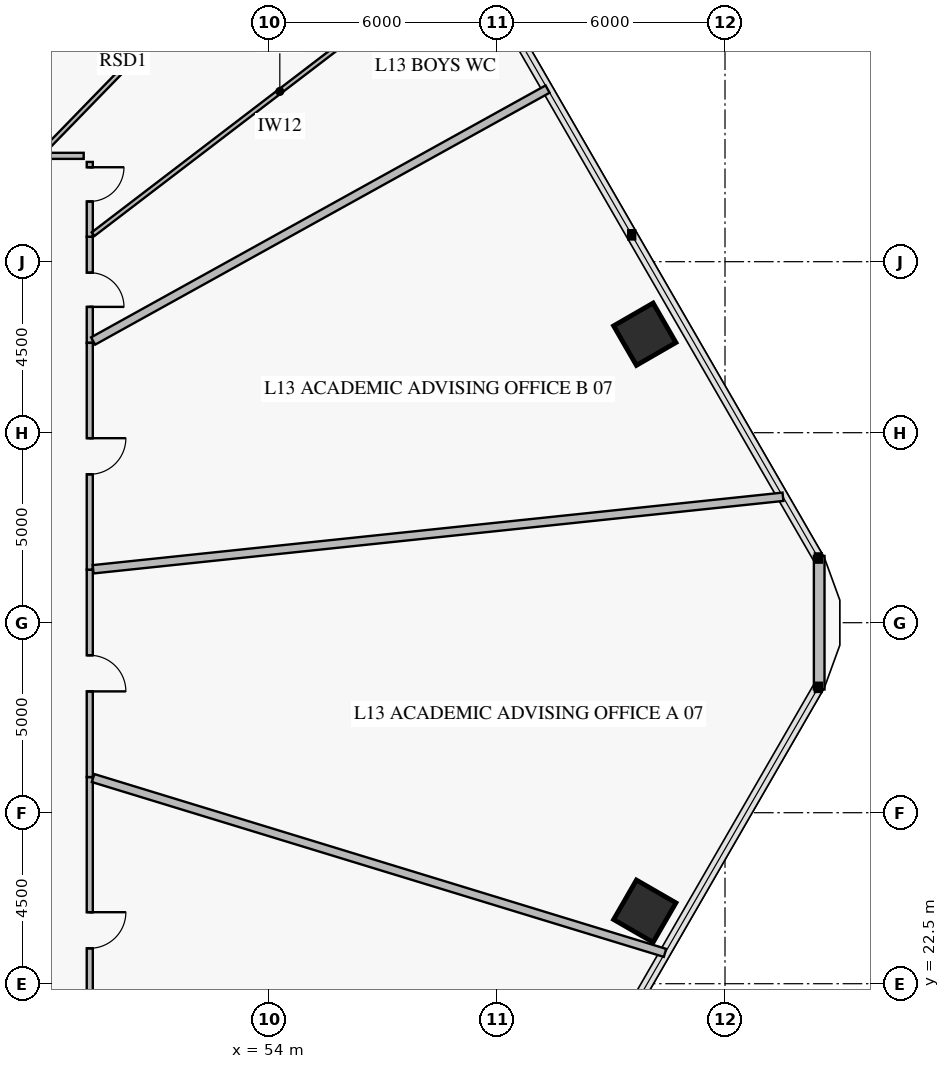
"""IFC4 building model, lengths in metres.
Left out: names, types, materials, properties, quantities, classifications, styles, units other than length and angle.
Written with IfcOpenShell. Run it as: python <this file> out.ifc"""

import sys

from ifc_helpers import new_model, si_unit, direction, frame, frame_2d, origin, origin_2d, place, context, subcontext, project, spatial, rectangle, extrude, element, fill, save


model = new_model("IFC4")
c1 = context("Model", 3, precision=1e-05, world=origin(), true_north=direction((0.0, 1.0)))
c2 = subcontext(c1, "Body", "Model", "MODEL_VIEW")
j1 = project(units=[si_unit("LENGTHUNIT", "METRE"), si_unit("PLANEANGLEUNIT", "RADIAN")], contexts=[c1])
p1 = place(None, origin())
s1 = spatial("IfcSite", under=j1, at=p1, CompositionType="ELEMENT")
p2 = place(p1, origin())
s2 = spatial("IfcBuilding", under=s1, at=p2, CompositionType="ELEMENT")
p3 = place(p2, frame((0.0, 0.0, 54.0)))
s3 = spatial("IfcBuildingStorey", under=s2, at=p3, CompositionType="ELEMENT", Elevation=54.0)
for number, where, z_axis, x_axis in (
    (1, (63.889, 39.592, 0.0), (0.0, 0.0, 1.0), (-0.5, 0.866, 0.0)),
    (2, (63.889, 24.408, 0.0), (0.0, 0.0, 1.0), (0.5, 0.866, 0.0)),
):
    element("IfcColumn", number, at=place(p3, frame(where, z_axis=z_axis, x_axis=x_axis)), inside=s3, PredefinedType="COLUMN", context=c2, shape_type="SweptSolid", body=[
        extrude(rectangle(XDim=1.2, YDim=1.2, at=origin_2d()), origin(), (0.0, 0.0, 1.0), 3.92),
    ])
p4 = place(p3, frame((68.479, 33.758, 0.0), z_axis=(0.0, 0.0, 1.0), x_axis=(0.0, -1.0, 0.0)))
e3 = element("IfcWall", 3, at=p4, inside=s3, PredefinedType="SOLIDWALL", context=c2, shape_type="SweptSolid", body=[
    extrude(rectangle(XDim=3.515, YDim=0.28, at=frame_2d((1.758, 0.0))), origin(), (0.0, 0.0, 1.0), 3.92),
])
p5 = place(p3, frame((49.285, 39.364, 0.0), z_axis=(0.0, 0.0, 1.0), x_axis=(0.0, 1.0, 0.0)))
e4 = element("IfcWall", 4, at=p5, inside=s3, PredefinedType="PARTITIONING", context=c2, shape_type="SweptSolid", body=[
    extrude(rectangle(XDim=2.793, YDim=0.16, at=frame_2d((1.396, 0.0))), origin(), (0.0, 0.0, 1.0), 3.92),
])
p6 = place(p5, frame((0.947, 0.0, 0.0)))
e5 = element("IfcOpeningElement", 5, at=p6, cuts=e4, PredefinedType="OPENING", context=c2, shape_type="SweptSolid", body=[
    extrude(rectangle(XDim=0.9, YDim=2.1, at=frame_2d((0.45, 1.05))), frame((0.0, 0.092, 0.0), z_axis=(0.0, -1.0, 0.0), x_axis=(1.0, 0.0, 0.0)), (0.0, 0.0, 1.0), 0.184),
])
p7 = place(p3, frame((49.285, 42.157, 0.0), z_axis=(0.0, 0.0, 1.0), x_axis=(0.0, 1.0, 0.0)))
e6 = element("IfcWall", 6, at=p7, inside=s3, PredefinedType="PARTITIONING", context=c2, shape_type="SweptSolid", body=[
    extrude(rectangle(XDim=1.968, YDim=0.16, at=frame_2d((0.984, 0.0))), origin(), (0.0, 0.0, 1.0), 3.92),
])
p8 = place(p7, frame((0.928, 0.0, 0.0)))
e7 = element("IfcOpeningElement", 7, at=p8, cuts=e6, PredefinedType="OPENING", context=c2, shape_type="SweptSolid", body=[
    extrude(rectangle(XDim=0.9, YDim=2.1, at=frame_2d((0.45, 1.05))), frame((0.0, 0.092, 0.0), z_axis=(0.0, -1.0, 0.0), x_axis=(1.0, 0.0, 0.0)), (0.0, 0.0, 1.0), 0.184),
])
p9 = place(p3, frame((49.285, 19.875, 0.0), z_axis=(0.0, 0.0, 1.0), x_axis=(0.0, 1.0, 0.0)))
e8 = element("IfcWall", 8, at=p9, inside=s3, PredefinedType="PARTITIONING", context=c2, shape_type="SweptSolid", body=[
    extrude(rectangle(XDim=8.063, YDim=0.16, at=frame_2d((4.032, 0.0))), origin(), (0.0, 0.0, 1.0), 3.92),
])
p10 = place(p9, frame((3.557, 0.0, 0.0)))
e9 = element("IfcOpeningElement", 9, at=p10, cuts=e8, PredefinedType="OPENING", context=c2, shape_type="SweptSolid", body=[
    extrude(rectangle(XDim=0.95, YDim=2.1, at=frame_2d((0.475, 1.05))), frame((0.0, 0.092, 0.0), z_axis=(0.0, -1.0, 0.0), x_axis=(1.0, 0.0, 0.0)), (0.0, 0.0, 1.0), 0.184),
])
p11 = place(p3, frame((49.285, 27.938, 0.0), z_axis=(0.0, 0.0, 1.0), x_axis=(0.0, 1.0, 0.0)))
e10 = element("IfcWall", 10, at=p11, inside=s3, PredefinedType="PARTITIONING", context=c2, shape_type="SweptSolid", body=[
    extrude(rectangle(XDim=5.458, YDim=0.16, at=frame_2d((2.729, 0.0))), origin(), (0.0, 0.0, 1.0), 3.22),
])
p12 = place(p11, frame((2.254, 0.0, 0.0)))
e11 = element("IfcOpeningElement", 11, at=p12, cuts=e10, PredefinedType="OPENING", context=c2, shape_type="SweptSolid", body=[
    extrude(rectangle(XDim=0.95, YDim=2.1, at=frame_2d((0.475, 1.05))), frame((0.0, 0.092, 0.0), z_axis=(0.0, -1.0, 0.0), x_axis=(1.0, 0.0, 0.0)), (0.0, 0.0, 1.0), 0.184),
])
p13 = place(p3, frame((49.285, 33.396, 0.0), z_axis=(0.0, 0.0, 1.0), x_axis=(0.0, 1.0, 0.0)))
e12 = element("IfcWall", 12, at=p13, inside=s3, PredefinedType="PARTITIONING", context=c2, shape_type="SweptSolid", body=[
    extrude(rectangle(XDim=5.968, YDim=0.16, at=frame_2d((2.984, 0.0))), origin(), (0.0, 0.0, 1.0), 3.22),
])
p14 = place(p13, frame((2.509, 0.0, 0.0)))
e13 = element("IfcOpeningElement", 13, at=p14, cuts=e12, PredefinedType="OPENING", context=c2, shape_type="SweptSolid", body=[
    extrude(rectangle(XDim=0.95, YDim=2.1, at=frame_2d((0.475, 1.05))), frame((0.0, 0.092, 0.0), z_axis=(0.0, -1.0, 0.0), x_axis=(1.0, 0.0, 0.0)), (0.0, 0.0, 1.0), 0.184),
])
p15 = place(p3, frame((49.373, 39.413, 0.0), z_axis=(0.0, 0.0, 1.0), x_axis=(0.874620963666, 0.484807353405, 0.0)))
e14 = element("IfcWall", 14, at=p15, inside=s3, PredefinedType="PARTITIONING", context=c2, shape_type="SweptSolid", body=[
    extrude(rectangle(XDim=13.673, YDim=0.22, at=frame_2d((6.836, 0.0))), origin(), (0.0, 0.0, 1.0), 3.17),
])
p16 = place(p3, frame((49.373, 42.225, 0.0), z_axis=(0.0, 0.0, 1.0), x_axis=(0.794422824401, 0.607365109362, 0.0)))
e15 = element("IfcWall", 15, at=p16, inside=s3, PredefinedType="PARTITIONING", context=c2, shape_type="SweptSolid", body=[
    extrude(rectangle(XDim=12.368, YDim=0.12, at=frame_2d((6.184, 0.0))), origin(), (0.0, 0.0, 1.0), 3.17),
])
p17 = place(p3, frame((49.125, 44.285, 0.0), z_axis=(0.0, 0.0, 1.0), x_axis=(-1.0, 0.0, 0.0)))
e16 = element("IfcWall", 16, at=p17, inside=s3, PredefinedType="PARTITIONING", context=c2, shape_type="SweptSolid", body=[
    extrude(rectangle(XDim=1.178, YDim=0.16, at=frame_2d((0.589, 0.0))), origin(), (0.0, 0.0, 1.0), 3.22),
])
p18 = place(p3, frame((48.032, 44.373, 0.0), z_axis=(0.0, 0.0, 1.0), x_axis=(0.697186119011, 0.716890169732, 0.0)))
e17 = element("IfcWall", 17, at=p18, inside=s3, PredefinedType="PARTITIONING", context=c2, shape_type="SweptSolid", body=[
    extrude(rectangle(XDim=5.501, YDim=0.12, at=frame_2d((2.75, 0.0))), origin(), (0.0, 0.0, 1.0), 3.47),
])
p19 = place(p3, frame((45.324, 44.373, 0.0), z_axis=(0.0, 0.0, 1.0), x_axis=(0.601817794095, 0.798633421984, 0.0)))
e18 = element("IfcWall", 18, at=p19, inside=s3, PredefinedType="PARTITIONING", context=c2, shape_type="SweptSolid", body=[
    extrude(rectangle(XDim=4.938, YDim=0.22, at=frame_2d((2.469, 0.0))), origin(), (0.0, 0.0, 1.0), 3.92),
])
p20 = place(p3, frame((49.373, 27.912, 0.0), z_axis=(0.0, 0.0, 1.0), x_axis=(0.956304467386, -0.292372648614, 0.0)))
e19 = element("IfcWall", 19, at=p20, inside=s3, PredefinedType="PARTITIONING", context=c2, shape_type="SweptSolid", body=[
    extrude(rectangle(XDim=15.736, YDim=0.22, at=frame_2d((7.868, 0.0))), origin(), (0.0, 0.0, 1.0), 3.17),
])
p21 = place(p3, frame((49.373, 33.406, 0.0), z_axis=(0.0, 0.0, 1.0), x_axis=(0.994521492256, 0.104532298553, 0.0)))
e20 = element("IfcWall", 20, at=p21, inside=s3, PredefinedType="PARTITIONING", context=c2, shape_type="SweptSolid", body=[
    extrude(rectangle(XDim=18.252, YDim=0.22, at=frame_2d((9.126, 0.0))), origin(), (0.0, 0.0, 1.0), 3.17),
])
p22 = place(p6, frame((0.9, 0.0, 0.0), z_axis=(0.0, 0.0, 1.0), x_axis=(-1.0, 0.0, 0.0)))
e21 = element("IfcDoor", 21, at=p22, inside=s3, OperationType="SINGLE_SWING_RIGHT", PredefinedType="DOOR", context=c2, shape_type="SweptSolid", body=[
    extrude(rectangle(XDim=0.9, YDim=2.1, at=frame_2d((0.45, 1.05))), frame((0.0, 0.025, 0.0), z_axis=(0.0, -1.0, 0.0), x_axis=(1.0, 0.0, 0.0)), (0.0, 0.0, 1.0), 0.05),
])
fill(e5, e21)
p23 = place(p8, frame((0.9, 0.0, 0.0), z_axis=(0.0, 0.0, 1.0), x_axis=(-1.0, 0.0, 0.0)))
e22 = element("IfcDoor", 22, at=p23, inside=s3, OperationType="SINGLE_SWING_LEFT", PredefinedType="DOOR", context=c2, shape_type="SweptSolid", body=[
    extrude(rectangle(XDim=0.9, YDim=2.1, at=frame_2d((0.45, 1.05))), frame((0.0, 0.025, 0.0), z_axis=(0.0, -1.0, 0.0), x_axis=(1.0, 0.0, 0.0)), (0.0, 0.0, 1.0), 0.05),
])
fill(e7, e22)
p24 = place(p10, frame((0.95, 0.0, 0.0), z_axis=(0.0, 0.0, 1.0), x_axis=(-1.0, 0.0, 0.0)))
e23 = element("IfcDoor", 23, at=p24, inside=s3, OperationType="SINGLE_SWING_LEFT", PredefinedType="DOOR", context=c2, shape_type="SweptSolid", body=[
    extrude(rectangle(XDim=0.95, YDim=2.1, at=frame_2d((0.475, 1.05))), frame((0.0, 0.025, 0.0), z_axis=(0.0, -1.0, 0.0), x_axis=(1.0, 0.0, 0.0)), (0.0, 0.0, 1.0), 0.05),
])
fill(e9, e23)
p25 = place(p12, frame((0.95, 0.0, 0.0), z_axis=(0.0, 0.0, 1.0), x_axis=(-1.0, 0.0, 0.0)))
e24 = element("IfcDoor", 24, at=p25, inside=s3, OperationType="SINGLE_SWING_RIGHT", PredefinedType="DOOR", context=c2, shape_type="SweptSolid", body=[
    extrude(rectangle(XDim=0.95, YDim=2.1, at=frame_2d((0.475, 1.05))), frame((0.0, 0.025, 0.0), z_axis=(0.0, -1.0, 0.0), x_axis=(1.0, 0.0, 0.0)), (0.0, 0.0, 1.0), 0.05),
])
fill(e11, e24)
p26 = place(p14, frame((0.95, 0.0, 0.0), z_axis=(0.0, 0.0, 1.0), x_axis=(-1.0, 0.0, 0.0)))
e25 = element("IfcDoor", 25, at=p26, inside=s3, OperationType="SINGLE_SWING_LEFT", PredefinedType="DOOR", context=c2, shape_type="SweptSolid", body=[
    extrude(rectangle(XDim=0.95, YDim=2.1, at=frame_2d((0.475, 1.05))), frame((0.0, 0.025, 0.0), z_axis=(0.0, -1.0, 0.0), x_axis=(1.0, 0.0, 0.0)), (0.0, 0.0, 1.0), 0.05),
])
fill(e13, e25)
save(model, sys.argv[1])
